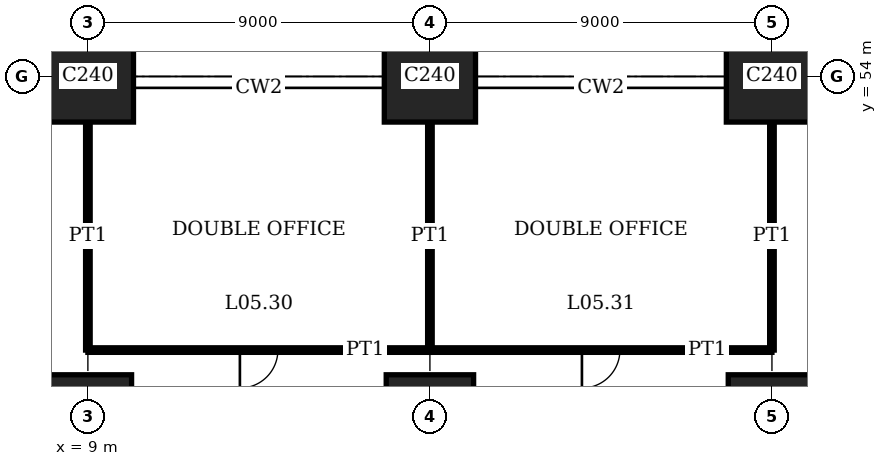
"""IFC4 building model, lengths in metres.
Left out: names, types, materials, properties, quantities, classifications, styles, units other than length and angle.
Written with IfcOpenShell. Run it as: python <this file> out.ifc"""

import sys

from ifc_helpers import new_model, si_unit, direction, frame, frame_2d, origin, origin_2d, place, context, subcontext, project, spatial, rectangle, extrude, element, fill, save


model = new_model("IFC4")
c1 = context("Model", 3, precision=1e-05, world=origin(), true_north=direction((0.0, 1.0)))
c2 = subcontext(c1, "Body", "Model", "MODEL_VIEW")
j1 = project(units=[si_unit("LENGTHUNIT", "METRE"), si_unit("PLANEANGLEUNIT", "RADIAN")], contexts=[c1])
p1 = place(None, origin())
s1 = spatial("IfcSite", under=j1, at=p1, CompositionType="ELEMENT")
p2 = place(p1, origin())
s2 = spatial("IfcBuilding", under=s1, at=p2, CompositionType="ELEMENT")
p3 = place(p2, frame((0.0, 0.0, 23.8)))
s3 = spatial("IfcBuildingStorey", under=s2, at=p3, CompositionType="ELEMENT", Elevation=23.8)
p4 = place(p3, frame((9.0, 45.0, 0.0), z_axis=(0.0, 0.0, 1.0), x_axis=(1.0, 0.0, 0.0)))
e1 = element("IfcColumn", 1, at=p4, inside=s3, PredefinedType="COLUMN", context=c2, shape_type="SweptSolid", body=[
    extrude(rectangle(XDim=2.3, YDim=2.3, at=origin_2d()), origin(), (0.0, 0.0, 1.0), 4.0),
])
p5 = place(p3, frame((9.0, 54.0, 0.0), z_axis=(0.0, 0.0, 1.0), x_axis=(1.0, 0.0, 0.0)))
e2 = element("IfcColumn", 2, at=p5, inside=s3, PredefinedType="COLUMN", context=c2, shape_type="SweptSolid", body=[
    extrude(rectangle(XDim=2.4, YDim=2.4, at=origin_2d()), origin(), (0.0, 0.0, 1.0), 4.0),
])
p6 = place(p3, frame((18.0, 45.0, 0.0), z_axis=(0.0, 0.0, 1.0), x_axis=(1.0, 0.0, 0.0)))
e3 = element("IfcColumn", 3, at=p6, inside=s3, PredefinedType="COLUMN", context=c2, shape_type="SweptSolid", body=[
    extrude(rectangle(XDim=2.3, YDim=2.3, at=origin_2d()), origin(), (0.0, 0.0, 1.0), 4.0),
])
p7 = place(p3, frame((18.0, 54.0, 0.0), z_axis=(0.0, 0.0, 1.0), x_axis=(1.0, 0.0, 0.0)))
e4 = element("IfcColumn", 4, at=p7, inside=s3, PredefinedType="COLUMN", context=c2, shape_type="SweptSolid", body=[
    extrude(rectangle(XDim=2.4, YDim=2.4, at=origin_2d()), origin(), (0.0, 0.0, 1.0), 4.0),
])
p8 = place(p3, frame((27.0, 45.0, 0.0), z_axis=(0.0, 0.0, 1.0), x_axis=(1.0, 0.0, 0.0)))
e5 = element("IfcColumn", 5, at=p8, inside=s3, PredefinedType="COLUMN", context=c2, shape_type="SweptSolid", body=[
    extrude(rectangle(XDim=2.3, YDim=2.3, at=origin_2d()), origin(), (0.0, 0.0, 1.0), 4.0),
])
p9 = place(p3, frame((27.0, 54.0, 0.0), z_axis=(0.0, 0.0, 1.0), x_axis=(1.0, 0.0, 0.0)))
e6 = element("IfcColumn", 6, at=p9, inside=s3, PredefinedType="COLUMN", context=c2, shape_type="SweptSolid", body=[
    extrude(rectangle(XDim=2.4, YDim=2.4, at=origin_2d()), origin(), (0.0, 0.0, 1.0), 4.0),
])
p10 = place(p3, frame((9.0, 46.8, 0.0), z_axis=(0.0, 0.0, 1.0), x_axis=(1.0, 0.0, 0.0)))
e7 = element("IfcWall", 7, at=p10, inside=s3, PredefinedType="PARTITIONING", context=c2, shape_type="SweptSolid", body=[
    extrude(rectangle(XDim=9.0, YDim=0.12, at=frame_2d((4.5, 0.0))), origin(), (0.0, 0.0, 1.0), 3.75),
])
p11 = place(p10, frame((4.0, 0.0, 0.0)))
e8 = element("IfcOpeningElement", 8, at=p11, cuts=e7, PredefinedType="OPENING", context=c2, shape_type="SweptSolid", body=[
    extrude(rectangle(XDim=1.0, YDim=2.4, at=frame_2d((0.5, 1.2))), frame((0.0, 0.07, 0.0), z_axis=(0.0, -1.0, 0.0), x_axis=(1.0, 0.0, 0.0)), (0.0, 0.0, 1.0), 0.14),
])
p12 = place(p3, frame((18.0, 46.8, 0.0), z_axis=(0.0, 0.0, 1.0), x_axis=(1.0, 0.0, 0.0)))
e9 = element("IfcWall", 9, at=p12, inside=s3, PredefinedType="PARTITIONING", context=c2, shape_type="SweptSolid", body=[
    extrude(rectangle(XDim=9.0, YDim=0.12, at=frame_2d((4.5, 0.0))), origin(), (0.0, 0.0, 1.0), 3.75),
])
p13 = place(p12, frame((4.0, 0.0, 0.0)))
e10 = element("IfcOpeningElement", 10, at=p13, cuts=e9, PredefinedType="OPENING", context=c2, shape_type="SweptSolid", body=[
    extrude(rectangle(XDim=1.0, YDim=2.4, at=frame_2d((0.5, 1.2))), frame((0.0, 0.07, 0.0), z_axis=(0.0, -1.0, 0.0), x_axis=(1.0, 0.0, 0.0)), (0.0, 0.0, 1.0), 0.14),
])
for number, where, z_axis, x_axis in (
    (11, (9.0, 46.8, 0.0), (0.0, 0.0, 1.0), (0.0, 1.0, 0.0)),
    (12, (18.0, 46.8, 0.0), (0.0, 0.0, 1.0), (0.0, 1.0, 0.0)),
    (13, (27.0, 46.8, 0.0), (0.0, 0.0, 1.0), (0.0, 1.0, 0.0)),
):
    element("IfcWall", number, at=place(p3, frame(where, z_axis=z_axis, x_axis=x_axis)), inside=s3, PredefinedType="PARTITIONING", context=c2, shape_type="SweptSolid", body=[
        extrude(rectangle(XDim=6.0, YDim=0.12, at=frame_2d((3.0, 0.0))), origin(), (0.0, 0.0, 1.0), 3.05),
    ])
p14 = place(p11, origin())
e14 = element("IfcDoor", 14, at=p14, inside=s3, OperationType="SINGLE_SWING_LEFT", PredefinedType="DOOR", context=c2, shape_type="SweptSolid", body=[
    extrude(rectangle(XDim=1.0, YDim=2.4, at=frame_2d((0.5, 1.2))), frame((0.0, 0.025, 0.0), z_axis=(0.0, -1.0, 0.0), x_axis=(1.0, 0.0, 0.0)), (0.0, 0.0, 1.0), 0.05),
])
fill(e8, e14)
p15 = place(p13, origin())
e15 = element("IfcDoor", 15, at=p15, inside=s3, OperationType="SINGLE_SWING_LEFT", PredefinedType="DOOR", context=c2, shape_type="SweptSolid", body=[
    extrude(rectangle(XDim=1.0, YDim=2.4, at=frame_2d((0.5, 1.2))), frame((0.0, 0.025, 0.0), z_axis=(0.0, -1.0, 0.0), x_axis=(1.0, 0.0, 0.0)), (0.0, 0.0, 1.0), 0.05),
])
fill(e10, e15)
save(model, sys.argv[1])
